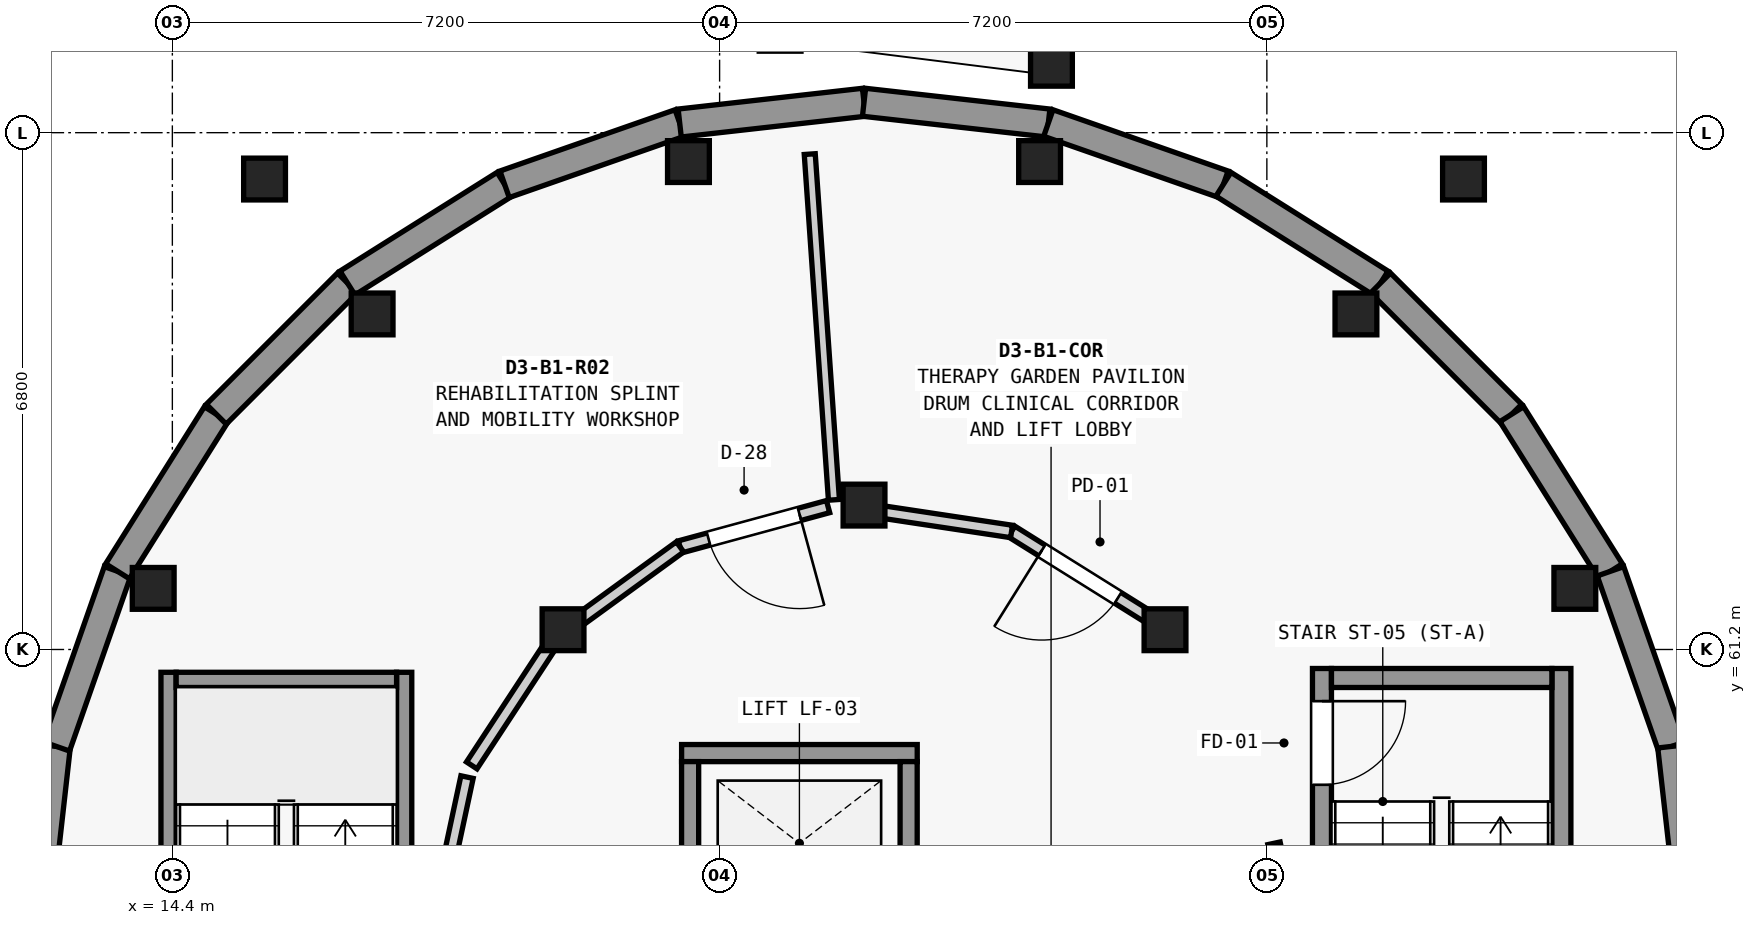
"""IFC4 building model, lengths in metres.
Left out: names, types, materials, properties, quantities, classifications, styles, units other than length and angle.
Written with IfcOpenShell. Run it as: python <this file> out.ifc"""

import sys

from ifc_helpers import new_model, si_unit, direction, frame, frame_2d, origin, origin_2d, place, context, subcontext, project, spatial, rectangle, extrude, element, fill, save


model = new_model("IFC4")
c1 = context("Model", 3, precision=1e-05, world=origin(), true_north=direction((0.0, 1.0)))
c2 = subcontext(c1, "Body", "Model", "MODEL_VIEW")
j1 = project(units=[si_unit("LENGTHUNIT", "METRE"), si_unit("PLANEANGLEUNIT", "RADIAN")], contexts=[c1])
p1 = place(None, origin())
s1 = spatial("IfcSite", under=j1, at=p1, CompositionType="ELEMENT")
p2 = place(p1, origin())
s2 = spatial("IfcBuilding", under=s1, at=p2, CompositionType="ELEMENT")
p3 = place(p2, frame((0.0, 0.0, -4.55)))
s3 = spatial("IfcBuildingStorey", under=s2, at=p3, CompositionType="ELEMENT", Elevation=-4.55)
for number, where, z_axis, x_axis in (
    (1, (32.852, 62.004, 0.0), (0.0, 0.0, 1.0), (1.0, 0.0, 0.0)),
    (2, (29.972, 65.615, 0.0), (0.0, 0.0, 1.0), (1.0, 0.0, 0.0)),
    (3, (25.81, 67.62, 0.0), (0.0, 0.0, 1.0), (1.0, 0.0, 0.0)),
    (4, (21.19, 67.62, 0.0), (0.0, 0.0, 1.0), (1.0, 0.0, 0.0)),
    (5, (17.028, 65.615, 0.0), (0.0, 0.0, 1.0), (1.0, 0.0, 0.0)),
    (6, (14.148, 62.004, 0.0), (0.0, 0.0, 1.0), (1.0, 0.0, 0.0)),
    (7, (27.46, 61.46, 0.0), (0.0, 0.0, 1.0), (1.0, 0.0, 0.0)),
    (8, (23.5, 63.1, 0.0), (0.0, 0.0, 1.0), (1.0, 0.0, 0.0)),
    (9, (19.54, 61.46, 0.0), (0.0, 0.0, 1.0), (1.0, 0.0, 0.0)),
    (10, (25.966, 68.887, 0.0), (0.0, 0.0, 1.0), (1.0, 0.0, 0.0)),
):
    element("IfcColumn", number, at=place(p3, frame(where, z_axis=z_axis, x_axis=x_axis)), inside=s3, PredefinedType="COLUMN", context=c2, shape_type="SweptSolid", body=[
        extrude(rectangle(XDim=0.55, YDim=0.55, at=origin_2d()), origin(), (0.0, 0.0, 1.0), 4.55),
    ])
for number, where, z_axis, x_axis in (
    (11, (31.387, 67.39, 0.0), (0.0, 0.0, 1.0), (1.0, 0.0, 0.0)),
    (12, (15.613, 67.39, 0.0), (0.0, 0.0, 1.0), (1.0, 0.0, 0.0)),
):
    element("IfcColumn", number, at=place(p3, frame(where, z_axis=z_axis, x_axis=x_axis)), inside=s3, PredefinedType="COLUMN", context=c2, shape_type="SweptSolid", body=[
        extrude(rectangle(XDim=0.55, YDim=0.55, at=origin_2d()), origin(), (0.0, 0.0, 1.0), 5.7),
    ])
p4 = place(p3, frame((12.6, 57.5, 0.0), z_axis=(0.0, 0.0, 1.0), x_axis=(0.111847873866, 0.993725340882, 0.0)))
e13 = element("IfcWall", 13, at=p4, inside=s3, PredefinedType="USERDEFINED", context=c2, shape_type="SweptSolid", body=[
    extrude(rectangle(XDim=2.44, YDim=0.37, at=frame_2d((1.22, 0.0))), origin(), (0.0, 0.0, 1.0), 3.335),
])
p5 = place(p3, frame((12.873, 59.925, 0.0), z_axis=(0.0, 0.0, 1.0), x_axis=(0.330176659411, 0.943919156274, 0.0)))
e14 = element("IfcWall", 14, at=p5, inside=s3, PredefinedType="USERDEFINED", context=c2, shape_type="SweptSolid", body=[
    extrude(rectangle(XDim=2.441, YDim=0.37, at=frame_2d((1.22, 0.0))), origin(), (0.0, 0.0, 1.0), 3.335),
])
p6 = place(p3, frame((13.679, 62.229, 0.0), z_axis=(0.0, 0.0, 1.0), x_axis=(0.532136726684, 0.846658434148, 0.0)))
e15 = element("IfcWall", 15, at=p6, inside=s3, PredefinedType="USERDEFINED", context=c2, shape_type="SweptSolid", body=[
    extrude(rectangle(XDim=2.441, YDim=0.37, at=frame_2d((1.221, 0.0))), origin(), (0.0, 0.0, 1.0), 3.335),
])
p7 = place(p3, frame((14.978, 64.296, 0.0), z_axis=(0.0, 0.0, 1.0), x_axis=(0.707106781187, 0.707106781187, 0.0)))
e16 = element("IfcWall", 16, at=p7, inside=s3, PredefinedType="USERDEFINED", context=c2, shape_type="SweptSolid", body=[
    extrude(rectangle(XDim=2.441, YDim=0.37, at=frame_2d((1.22, 0.0))), origin(), (0.0, 0.0, 1.0), 3.335),
])
p8 = place(p3, frame((16.704, 66.022, 0.0), z_axis=(0.0, 0.0, 1.0), x_axis=(0.846658434148, 0.532136726684, 0.0)))
e17 = element("IfcWall", 17, at=p8, inside=s3, PredefinedType="USERDEFINED", context=c2, shape_type="SweptSolid", body=[
    extrude(rectangle(XDim=2.441, YDim=0.37, at=frame_2d((1.221, 0.0))), origin(), (0.0, 0.0, 1.0), 3.335),
])
p9 = place(p3, frame((18.771, 67.321, 0.0), z_axis=(0.0, 0.0, 1.0), x_axis=(0.943919156274, 0.330176659411, 0.0)))
e18 = element("IfcWall", 18, at=p9, inside=s3, PredefinedType="USERDEFINED", context=c2, shape_type="SweptSolid", body=[
    extrude(rectangle(XDim=2.441, YDim=0.37, at=frame_2d((1.22, 0.0))), origin(), (0.0, 0.0, 1.0), 3.335),
])
for number, where, z_axis, x_axis in (
    (19, (21.075, 68.127, 0.0), (0.0, 0.0, 1.0), (0.994, 0.112, 0.0)),
    (20, (23.5, 68.4, 0.0), (0.0, 0.0, 1.0), (0.994, -0.112, 0.0)),
):
    element("IfcWall", number, at=place(p3, frame(where, z_axis=z_axis, x_axis=x_axis)), inside=s3, PredefinedType="USERDEFINED", context=c2, shape_type="SweptSolid", body=[
        extrude(rectangle(XDim=2.44, YDim=0.37, at=frame_2d((1.22, 0.0))), origin(), (0.0, 0.0, 1.0), 3.335),
    ])
p10 = place(p3, frame((25.925, 68.127, 0.0), z_axis=(0.0, 0.0, 1.0), x_axis=(0.943919156274, -0.330176659411, 0.0)))
e21 = element("IfcWall", 21, at=p10, inside=s3, PredefinedType="USERDEFINED", context=c2, shape_type="SweptSolid", body=[
    extrude(rectangle(XDim=2.441, YDim=0.37, at=frame_2d((1.22, 0.0))), origin(), (0.0, 0.0, 1.0), 3.335),
])
p11 = place(p3, frame((28.229, 67.321, 0.0), z_axis=(0.0, 0.0, 1.0), x_axis=(0.846658434148, -0.532136726684, 0.0)))
e22 = element("IfcWall", 22, at=p11, inside=s3, PredefinedType="USERDEFINED", context=c2, shape_type="SweptSolid", body=[
    extrude(rectangle(XDim=2.441, YDim=0.37, at=frame_2d((1.221, 0.0))), origin(), (0.0, 0.0, 1.0), 3.335),
])
p12 = place(p3, frame((30.296, 66.022, 0.0), z_axis=(0.0, 0.0, 1.0), x_axis=(0.707106781187, -0.707106781187, 0.0)))
e23 = element("IfcWall", 23, at=p12, inside=s3, PredefinedType="USERDEFINED", context=c2, shape_type="SweptSolid", body=[
    extrude(rectangle(XDim=2.441, YDim=0.37, at=frame_2d((1.22, 0.0))), origin(), (0.0, 0.0, 1.0), 3.335),
])
p13 = place(p3, frame((32.022, 64.296, 0.0), z_axis=(0.0, 0.0, 1.0), x_axis=(0.532136726684, -0.846658434148, 0.0)))
e24 = element("IfcWall", 24, at=p13, inside=s3, PredefinedType="USERDEFINED", context=c2, shape_type="SweptSolid", body=[
    extrude(rectangle(XDim=2.441, YDim=0.37, at=frame_2d((1.221, 0.0))), origin(), (0.0, 0.0, 1.0), 3.335),
])
p14 = place(p3, frame((33.321, 62.229, 0.0), z_axis=(0.0, 0.0, 1.0), x_axis=(0.330176659411, -0.943919156274, 0.0)))
e25 = element("IfcWall", 25, at=p14, inside=s3, PredefinedType="USERDEFINED", context=c2, shape_type="SweptSolid", body=[
    extrude(rectangle(XDim=2.441, YDim=0.37, at=frame_2d((1.22, 0.0))), origin(), (0.0, 0.0, 1.0), 3.335),
])
p15 = place(p3, frame((34.127, 59.925, 0.0), z_axis=(0.0, 0.0, 1.0), x_axis=(0.111847873866, -0.993725340882, 0.0)))
e26 = element("IfcWall", 26, at=p15, inside=s3, PredefinedType="USERDEFINED", context=c2, shape_type="SweptSolid", body=[
    extrude(rectangle(XDim=2.44, YDim=0.37, at=frame_2d((1.22, 0.0))), origin(), (0.0, 0.0, 1.0), 3.335),
])
p16 = place(p3, frame((29.525, 60.95, 0.0), z_axis=(0.0, 0.0, 1.0), x_axis=(0.0, -1.0, 0.0)))
e27 = element("IfcWall", 27, at=p16, inside=s3, PredefinedType="SHEAR", context=c2, shape_type="SweptSolid", body=[
    extrude(rectangle(XDim=6.9, YDim=0.25, at=frame_2d((3.45, 0.0))), origin(), (0.0, 0.0, 1.0), 4.135),
])
p17 = place(p16, frame((0.43, 0.0, 0.0)))
e28 = element("IfcOpeningElement", 28, at=p17, cuts=e27, PredefinedType="OPENING", context=c2, shape_type="SweptSolid", body=[
    extrude(rectangle(XDim=1.1, YDim=2.15, at=frame_2d((0.55, 1.075))), frame((0.0, 0.135, 0.0), z_axis=(0.0, -1.0, 0.0), x_axis=(1.0, 0.0, 0.0)), (0.0, 0.0, 1.0), 0.27),
])
p18 = place(p3, frame((32.675, 60.95, 0.0), z_axis=(0.0, 0.0, 1.0), x_axis=(0.0, -1.0, 0.0)))
e29 = element("IfcWall", 29, at=p18, inside=s3, PredefinedType="SHEAR", context=c2, shape_type="SweptSolid", body=[
    extrude(rectangle(XDim=6.9, YDim=0.25, at=frame_2d((3.45, 0.0))), origin(), (0.0, 0.0, 1.0), 4.135),
])
p19 = place(p3, frame((29.65, 60.825, 0.0), z_axis=(0.0, 0.0, 1.0), x_axis=(1.0, 0.0, 0.0)))
e30 = element("IfcWall", 30, at=p19, inside=s3, PredefinedType="SHEAR", context=c2, shape_type="SweptSolid", body=[
    extrude(rectangle(XDim=2.9, YDim=0.25, at=frame_2d((1.45, 0.0))), origin(), (0.0, 0.0, 1.0), 4.135),
])
p20 = place(p3, frame((17.45, 54.1, 0.0), z_axis=(0.0, 0.0, 1.0), x_axis=(0.0, 1.0, 0.0)))
e31 = element("IfcWall", 31, at=p20, inside=s3, PredefinedType="SHEAR", context=c2, shape_type="SweptSolid", body=[
    extrude(rectangle(XDim=6.8, YDim=0.2, at=frame_2d((3.4, 0.0))), origin(), (0.0, 0.0, 1.0), 4.135),
])
p21 = place(p20, frame((0.38, 0.0, 0.0)))
e32 = element("IfcOpeningElement", 32, at=p21, cuts=e31, PredefinedType="OPENING", context=c2, shape_type="SweptSolid", body=[
    extrude(rectangle(XDim=1.05, YDim=2.15, at=frame_2d((0.525, 1.075))), frame((0.0, 0.11, 0.0), z_axis=(0.0, -1.0, 0.0), x_axis=(1.0, 0.0, 0.0)), (0.0, 0.0, 1.0), 0.22),
])
p22 = place(p3, frame((14.35, 54.1, 0.0), z_axis=(0.0, 0.0, 1.0), x_axis=(0.0, 1.0, 0.0)))
e33 = element("IfcWall", 33, at=p22, inside=s3, PredefinedType="SHEAR", context=c2, shape_type="SweptSolid", body=[
    extrude(rectangle(XDim=6.8, YDim=0.2, at=frame_2d((3.4, 0.0))), origin(), (0.0, 0.0, 1.0), 4.135),
])
p23 = place(p3, frame((17.35, 60.8, 0.0), z_axis=(0.0, 0.0, 1.0), x_axis=(-1.0, 0.0, 0.0)))
e34 = element("IfcWall", 34, at=p23, inside=s3, PredefinedType="SHEAR", context=c2, shape_type="SweptSolid", body=[
    extrude(rectangle(XDim=2.9, YDim=0.2, at=frame_2d((1.45, 0.0))), origin(), (0.0, 0.0, 1.0), 4.135),
])
p24 = place(p3, frame((21.1, 59.837, 0.0), z_axis=(0.0, 0.0, 1.0), x_axis=(1.0, 0.0, 0.0)))
e35 = element("IfcWall", 35, at=p24, inside=s3, PredefinedType="SHEAR", context=c2, shape_type="SweptSolid", body=[
    extrude(rectangle(XDim=3.1, YDim=0.225, at=frame_2d((1.55, 0.0))), origin(), (0.0, 0.0, 1.0), 4.135),
])
for number, where, z_axis, x_axis in (
    (36, (21.212, 57.575, 0.0), (0.0, 0.0, 1.0), (0.0, 1.0, 0.0)),
    (37, (24.087, 57.575, 0.0), (0.0, 0.0, 1.0), (0.0, 1.0, 0.0)),
):
    element("IfcWall", number, at=place(p3, frame(where, z_axis=z_axis, x_axis=x_axis)), inside=s3, PredefinedType="SHEAR", context=c2, shape_type="SweptSolid", body=[
        extrude(rectangle(XDim=2.15, YDim=0.225, at=frame_2d((1.075, 0.0))), origin(), (0.0, 0.0, 1.0), 4.135),
    ])
p25 = place(p3, frame((23.104, 63.169, 0.0), z_axis=(0.0, 0.0, 1.0), x_axis=(-0.069759335413, 0.997563850148, 0.0)))
e38 = element("IfcWall", 38, at=p25, inside=s3, PredefinedType="PARTITIONING", context=c2, shape_type="SweptSolid", body=[
    extrude(rectangle(XDim=4.56, YDim=0.145, at=frame_2d((2.28, 0.0))), origin(), (0.0, 0.0, 1.0), 3.31),
])
p26 = place(p3, frame((27.238, 61.63, 0.0), z_axis=(0.0, 0.0, 1.0), x_axis=(-0.848030663633, 0.529947161081, 0.0)))
e39 = element("IfcWall", 39, at=p26, inside=s3, PredefinedType="PARTITIONING", context=c2, shape_type="SweptSolid", body=[
    extrude(rectangle(XDim=2.119, YDim=0.165, at=frame_2d((1.06, 0.0))), origin(), (0.0, 0.0, 1.0), 3.31),
])
p27 = place(p26, frame((0.469, 0.0, 0.0)))
e40 = element("IfcOpeningElement", 40, at=p27, cuts=e39, PredefinedType="OPENING", context=c2, shape_type="SweptSolid", body=[
    extrude(rectangle(XDim=1.18, YDim=2.2, at=frame_2d((0.59, 1.1))), frame((0.0, 0.093, 0.0), z_axis=(0.0, -1.0, 0.0), x_axis=(1.0, 0.0, 0.0)), (0.0, 0.0, 1.0), 0.185),
])
p28 = place(p3, frame((25.441, 62.753, 0.0), z_axis=(0.0, 0.0, 1.0), x_axis=(-0.988808298797, 0.149191649331, 0.0)))
e41 = element("IfcWall", 41, at=p28, inside=s3, PredefinedType="PARTITIONING", context=c2, shape_type="SweptSolid", body=[
    extrude(rectangle(XDim=1.697, YDim=0.165, at=frame_2d((0.849, 0.0))), origin(), (0.0, 0.0, 1.0), 3.31),
])
p29 = place(p3, frame((23.027, 63.08, 0.0), z_axis=(0.0, 0.0, 1.0), x_axis=(-0.964919932979, -0.262544325667, 0.0)))
e42 = element("IfcWall", 42, at=p29, inside=s3, PredefinedType="PARTITIONING", context=c2, shape_type="SweptSolid", body=[
    extrude(rectangle(XDim=2.019, YDim=0.165, at=frame_2d((1.009, 0.0))), origin(), (0.0, 0.0, 1.0), 3.31),
])
p30 = place(p29, frame((0.389, 0.0, 0.0)))
e43 = element("IfcOpeningElement", 43, at=p30, cuts=e42, PredefinedType="OPENING", context=c2, shape_type="SweptSolid", body=[
    extrude(rectangle(XDim=1.24, YDim=2.22, at=frame_2d((0.62, 1.11))), frame((0.0, 0.093, 0.0), z_axis=(0.0, -1.0, 0.0), x_axis=(1.0, 0.0, 0.0)), (0.0, 0.0, 1.0), 0.185),
])
p31 = place(p3, frame((21.079, 62.55, 0.0), z_axis=(0.0, 0.0, 1.0), x_axis=(-0.808860869398, -0.588000079895, 0.0)))
e44 = element("IfcWall", 44, at=p31, inside=s3, PredefinedType="PARTITIONING", context=c2, shape_type="SweptSolid", body=[
    extrude(rectangle(XDim=1.607, YDim=0.165, at=frame_2d((0.804, 0.0))), origin(), (0.0, 0.0, 1.0), 3.31),
])
p32 = place(p3, frame((19.366, 61.241, 0.0), z_axis=(0.0, 0.0, 1.0), x_axis=(-0.548365930053, -0.836238486771, 0.0)))
e45 = element("IfcWall", 45, at=p32, inside=s3, PredefinedType="PARTITIONING", context=c2, shape_type="SweptSolid", body=[
    extrude(rectangle(XDim=1.873, YDim=0.165, at=frame_2d((0.936, 0.0))), origin(), (0.0, 0.0, 1.0), 3.31),
])
p33 = place(p3, frame((18.277, 59.521, 0.0), z_axis=(0.0, 0.0, 1.0), x_axis=(-0.209500701014, -0.977808496729, 0.0)))
e46 = element("IfcWall", 46, at=p33, inside=s3, PredefinedType="PARTITIONING", context=c2, shape_type="SweptSolid", body=[
    extrude(rectangle(XDim=1.762, YDim=0.165, at=frame_2d((0.881, 0.0))), origin(), (0.0, 0.0, 1.0), 3.31),
])
p34 = place(p3, frame((29.097, 57.693, 0.0), z_axis=(0.0, 0.0, 1.0), x_axis=(-0.20743182321, 0.978249476729, 0.0)))
e47 = element("IfcWall", 47, at=p34, inside=s3, PredefinedType="PARTITIONING", context=c2, shape_type="SweptSolid", body=[
    extrude(rectangle(XDim=0.978, YDim=0.165, at=frame_2d((0.489, 0.0))), origin(), (0.0, 0.0, 1.0), 3.31),
])
p35 = place(p17, origin())
e48 = element("IfcDoor", 48, at=p35, inside=s3, OperationType="SINGLE_SWING_LEFT", PredefinedType="DOOR", context=c2, shape_type="SweptSolid", body=[
    extrude(rectangle(XDim=1.1, YDim=2.15, at=frame_2d((0.55, 1.075))), frame((0.0, 0.025, 0.0), z_axis=(0.0, -1.0, 0.0), x_axis=(1.0, 0.0, 0.0)), (0.0, 0.0, 1.0), 0.05),
])
fill(e28, e48)
p36 = place(p27, origin())
e49 = element("IfcDoor", 49, at=p36, inside=s3, OperationType="SINGLE_SWING_RIGHT", PredefinedType="DOOR", context=c2, shape_type="SweptSolid", body=[
    extrude(rectangle(XDim=1.18, YDim=2.2, at=frame_2d((0.59, 1.1))), frame((0.0, 0.025, 0.0), z_axis=(0.0, -1.0, 0.0), x_axis=(1.0, 0.0, 0.0)), (0.0, 0.0, 1.0), 0.05),
])
fill(e40, e49)
p37 = place(p30, origin())
e50 = element("IfcDoor", 50, at=p37, inside=s3, OperationType="SINGLE_SWING_LEFT", PredefinedType="DOOR", context=c2, shape_type="SweptSolid", body=[
    extrude(rectangle(XDim=1.24, YDim=2.22, at=frame_2d((0.62, 1.11))), frame((0.0, 0.025, 0.0), z_axis=(0.0, -1.0, 0.0), x_axis=(1.0, 0.0, 0.0)), (0.0, 0.0, 1.0), 0.05),
])
fill(e43, e50)
save(model, sys.argv[1])
